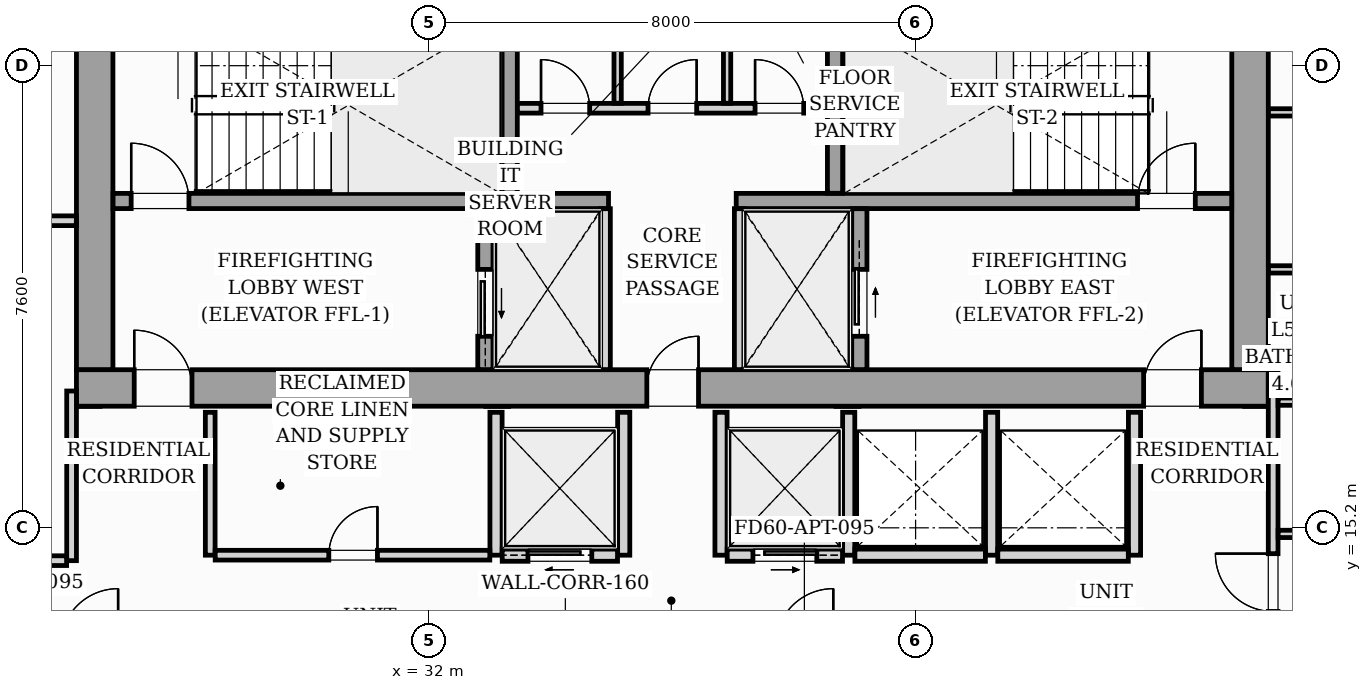
"""IFC4 building model, lengths in metres.
Left out: names, types, materials, properties, quantities, classifications, styles, units other than length and angle.
Written with IfcOpenShell. Run it as: python <this file> out.ifc"""

import sys

from ifc_helpers import new_model, si_unit, direction, frame, frame_2d, origin, origin_2d, place, context, subcontext, project, spatial, rectangle, i_section, extrude, source, transform, mapped, element, fill, save


model = new_model("IFC4")
c1 = context("Model", 3, precision=1e-05, world=origin(), true_north=direction((0.0, 1.0)))
c2 = subcontext(c1, "Body", "Model", "MODEL_VIEW")
j1 = project(units=[si_unit("LENGTHUNIT", "METRE"), si_unit("PLANEANGLEUNIT", "RADIAN")], contexts=[c1])
p1 = place(None, origin())
s1 = spatial("IfcSite", under=j1, at=p1, CompositionType="ELEMENT")
p2 = place(p1, origin())
s2 = spatial("IfcBuilding", under=s1, at=p2, CompositionType="ELEMENT")
p3 = place(p2, frame((0.0, 0.0, 179.4)))
s3 = spatial("IfcBuildingStorey", under=s2, at=p3, CompositionType="ELEMENT", Elevation=179.4)
m1 = source(origin(), c2, "Body", "SweptSolid", [
    extrude(i_section(OverallWidth=0.416, OverallDepth=0.446, WebThickness=0.039, FlangeThickness=0.063, FilletRadius=0.018, at=origin_2d()), origin(), (0.0, 0.0, 1.0), 3.196),
])
for number, where, z_axis, x_axis in (
    (1, (26.4, 17.4, 0.002), (0.0, 0.0, 1.0), (1.0, 0.0, 0.0)),
    (2, (33.12, 17.4, 0.002), (0.0, 0.0, 1.0), (1.0, 0.0, 0.0)),
    (3, (38.88, 17.4, 0.002), (0.0, 0.0, 1.0), (1.0, 0.0, 0.0)),
    (4, (45.6, 17.4, 0.002), (0.0, 0.0, 1.0), (1.0, 0.0, 0.0)),
):
    element("IfcColumn", number, at=place(p3, frame(where, z_axis=z_axis, x_axis=x_axis)), inside=s3, PredefinedType="PILASTER", context=c2, shape_type="MappedRepresentation", body=[
        mapped(m1, transform((0.0, 0.0, 0.0), scale=1.0)),
    ])
p4 = place(p3, frame((26.2, 17.5, 0.0), z_axis=(0.0, 0.0, 1.0), x_axis=(1.0, 0.0, 0.0)))
e5 = element("IfcWall", 5, at=p4, inside=s3, PredefinedType="SHEAR", context=c2, shape_type="SweptSolid", body=[
    extrude(rectangle(XDim=19.6, YDim=0.6, at=frame_2d((9.8, 0.0))), origin(), (0.0, 0.0, 1.0), 3.2),
])
p5 = place(p4, frame((0.95, 0.0, 0.0)))
e6 = element("IfcOpeningElement", 6, at=p5, cuts=e5, PredefinedType="OPENING", context=c2, shape_type="SweptSolid", body=[
    extrude(rectangle(XDim=0.95, YDim=2.06, at=frame_2d((0.475, 1.03))), frame((0.0, 0.31, 0.0), z_axis=(0.0, -1.0, 0.0), x_axis=(1.0, 0.0, 0.0)), (0.0, 0.0, 1.0), 0.62),
])
p6 = place(p4, frame((9.38, 0.0, 0.0)))
e7 = element("IfcOpeningElement", 7, at=p6, cuts=e5, PredefinedType="OPENING", context=c2, shape_type="SweptSolid", body=[
    extrude(rectangle(XDim=0.85, YDim=2.0, at=frame_2d((0.425, 1.0))), frame((0.0, 0.31, 0.0), z_axis=(0.0, -1.0, 0.0), x_axis=(1.0, 0.0, 0.0)), (0.0, 0.0, 1.0), 0.62),
])
p7 = place(p4, frame((17.55, 0.0, 0.0)))
e8 = element("IfcOpeningElement", 8, at=p7, cuts=e5, PredefinedType="OPENING", context=c2, shape_type="SweptSolid", body=[
    extrude(rectangle(XDim=0.95, YDim=2.06, at=frame_2d((0.475, 1.03))), frame((0.0, 0.31, 0.0), z_axis=(0.0, -1.0, 0.0), x_axis=(1.0, 0.0, 0.0)), (0.0, 0.0, 1.0), 0.62),
])
for number, where, z_axis, x_axis in (
    (9, (26.5, 17.802, 0.0), (0.0, 0.0, 1.0), (0.0, 1.0, 0.0)),
    (10, (45.5, 17.802, 0.0), (0.0, 0.0, 1.0), (0.0, 1.0, 0.0)),
):
    element("IfcWall", number, at=place(p3, frame(where, z_axis=z_axis, x_axis=x_axis)), inside=s3, PredefinedType="SHEAR", context=c2, shape_type="SweptSolid", body=[
        extrude(rectangle(XDim=5.796, YDim=0.6, at=frame_2d((2.898, 0.0))), origin(), (0.0, 0.0, 1.0), 3.2),
    ])
p8 = place(p3, frame((26.802, 20.575, 0.0), z_axis=(0.0, 0.0, 1.0), x_axis=(1.0, 0.0, 0.0)))
e11 = element("IfcWall", 11, at=p8, inside=s3, PredefinedType="SOLIDWALL", context=c2, shape_type="SweptSolid", body=[
    extrude(rectangle(XDim=8.148, YDim=0.25, at=frame_2d((4.074, 0.0))), origin(), (0.0, 0.0, 1.0), 3.2),
])
p9 = place(p8, frame((0.298, 0.0, 0.0)))
e12 = element("IfcOpeningElement", 12, at=p9, cuts=e11, PredefinedType="OPENING", context=c2, shape_type="SweptSolid", body=[
    extrude(rectangle(XDim=0.95, YDim=2.06, at=frame_2d((0.475, 1.03))), frame((0.0, 0.135, 0.0), z_axis=(0.0, -1.0, 0.0), x_axis=(1.0, 0.0, 0.0)), (0.0, 0.0, 1.0), 0.27),
])
p10 = place(p3, frame((37.05, 20.575, 0.0), z_axis=(0.0, 0.0, 1.0), x_axis=(1.0, 0.0, 0.0)))
e13 = element("IfcWall", 13, at=p10, inside=s3, PredefinedType="SOLIDWALL", context=c2, shape_type="SweptSolid", body=[
    extrude(rectangle(XDim=8.148, YDim=0.25, at=frame_2d((4.074, 0.0))), origin(), (0.0, 0.0, 1.0), 3.2),
])
p11 = place(p10, frame((6.6, 0.0, 0.0)))
e14 = element("IfcOpeningElement", 14, at=p11, cuts=e13, PredefinedType="OPENING", context=c2, shape_type="SweptSolid", body=[
    extrude(rectangle(XDim=0.95, YDim=2.06, at=frame_2d((0.475, 1.03))), frame((0.0, 0.135, 0.0), z_axis=(0.0, -1.0, 0.0), x_axis=(1.0, 0.0, 0.0)), (0.0, 0.0, 1.0), 0.27),
])
for number, where, z_axis, x_axis in (
    (15, (33.325, 20.702, 0.0), (0.0, 0.0, 1.0), (0.0, 1.0, 0.0)),
    (16, (38.675, 20.702, 0.0), (0.0, 0.0, 1.0), (0.0, 1.0, 0.0)),
):
    element("IfcWall", number, at=place(p3, frame(where, z_axis=z_axis, x_axis=x_axis)), inside=s3, PredefinedType="SOLIDWALL", context=c2, shape_type="SweptSolid", body=[
        extrude(rectangle(XDim=2.896, YDim=0.25, at=frame_2d((1.448, 0.0))), origin(), (0.0, 0.0, 1.0), 3.2),
    ])
p12 = place(p3, frame((32.925, 17.802, 0.0), z_axis=(0.0, 0.0, 1.0), x_axis=(0.0, 1.0, 0.0)))
e17 = element("IfcWall", 17, at=p12, inside=s3, PredefinedType="SOLIDWALL", context=c2, shape_type="SweptSolid", body=[
    extrude(rectangle(XDim=2.646, YDim=0.25, at=frame_2d((1.323, 0.0))), origin(), (0.0, 0.0, 1.0), 3.2),
])
p13 = place(p12, frame((0.548, 0.0, 0.0)))
e18 = element("IfcOpeningElement", 18, at=p13, cuts=e17, PredefinedType="OPENING", context=c2, shape_type="SweptSolid", body=[
    extrude(rectangle(XDim=1.1, YDim=2.08, at=frame_2d((0.55, 1.04))), frame((0.0, 0.135, 0.0), z_axis=(0.0, -1.0, 0.0), x_axis=(1.0, 0.0, 0.0)), (0.0, 0.0, 1.0), 0.27),
])
for number, where, z_axis, x_axis in (
    (19, (34.9, 17.802, 0.0), (0.0, 0.0, 1.0), (0.0, 1.0, 0.0)),
    (20, (37.1, 17.802, 0.0), (0.0, 0.0, 1.0), (0.0, 1.0, 0.0)),
):
    element("IfcWall", number, at=place(p3, frame(where, z_axis=z_axis, x_axis=x_axis)), inside=s3, PredefinedType="PARTITIONING", context=c2, shape_type="SweptSolid", body=[
        extrude(rectangle(XDim=2.646, YDim=0.16, at=frame_2d((1.323, 0.0))), origin(), (0.0, 0.0, 1.0), 2.94),
    ])
p14 = place(p3, frame((39.075, 17.802, 0.0), z_axis=(0.0, 0.0, 1.0), x_axis=(0.0, 1.0, 0.0)))
e21 = element("IfcWall", 21, at=p14, inside=s3, PredefinedType="SOLIDWALL", context=c2, shape_type="SweptSolid", body=[
    extrude(rectangle(XDim=2.646, YDim=0.25, at=frame_2d((1.323, 0.0))), origin(), (0.0, 0.0, 1.0), 3.2),
])
p15 = place(p14, frame((0.548, 0.0, 0.0)))
e22 = element("IfcOpeningElement", 22, at=p15, cuts=e21, PredefinedType="OPENING", context=c2, shape_type="SweptSolid", body=[
    extrude(rectangle(XDim=1.1, YDim=2.08, at=frame_2d((0.55, 1.04))), frame((0.0, 0.135, 0.0), z_axis=(0.0, -1.0, 0.0), x_axis=(1.0, 0.0, 0.0)), (0.0, 0.0, 1.0), 0.27),
])
p16 = place(p3, frame((33.452, 22.1, 0.0), z_axis=(0.0, 0.0, 1.0), x_axis=(1.0, 0.0, 0.0)))
e23 = element("IfcWall", 23, at=p16, inside=s3, PredefinedType="PARTITIONING", context=c2, shape_type="SweptSolid", body=[
    extrude(rectangle(XDim=5.096, YDim=0.16, at=frame_2d((2.548, 0.0))), origin(), (0.0, 0.0, 1.0), 2.94),
])
p17 = place(p16, frame((0.388, 0.0, 0.0)))
e24 = element("IfcOpeningElement", 24, at=p17, cuts=e23, PredefinedType="OPENING", context=c2, shape_type="SweptSolid", body=[
    extrude(rectangle(XDim=0.8, YDim=2.05, at=frame_2d((0.4, 1.025))), frame((0.0, 0.09, 0.0), z_axis=(0.0, -1.0, 0.0), x_axis=(1.0, 0.0, 0.0)), (0.0, 0.0, 1.0), 0.18),
])
p18 = place(p16, frame((2.148, 0.0, 0.0)))
e25 = element("IfcOpeningElement", 25, at=p18, cuts=e23, PredefinedType="OPENING", context=c2, shape_type="SweptSolid", body=[
    extrude(rectangle(XDim=0.8, YDim=2.05, at=frame_2d((0.4, 1.025))), frame((0.0, 0.09, 0.0), z_axis=(0.0, -1.0, 0.0), x_axis=(1.0, 0.0, 0.0)), (0.0, 0.0, 1.0), 0.18),
])
p19 = place(p16, frame((3.908, 0.0, 0.0)))
e26 = element("IfcOpeningElement", 26, at=p19, cuts=e23, PredefinedType="OPENING", context=c2, shape_type="SweptSolid", body=[
    extrude(rectangle(XDim=0.8, YDim=2.05, at=frame_2d((0.4, 1.025))), frame((0.0, 0.09, 0.0), z_axis=(0.0, -1.0, 0.0), x_axis=(1.0, 0.0, 0.0)), (0.0, 0.0, 1.0), 0.18),
])
for number, where, z_axis, x_axis in (
    (27, (35.1, 22.182, 0.0), (0.0, 0.0, 1.0), (0.0, 1.0, 0.0)),
    (28, (36.9, 22.182, 0.0), (0.0, 0.0, 1.0), (0.0, 1.0, 0.0)),
):
    element("IfcWall", number, at=place(p3, frame(where, z_axis=z_axis, x_axis=x_axis)), inside=s3, PredefinedType="PARTITIONING", context=c2, shape_type="SweptSolid", body=[
        extrude(rectangle(XDim=1.416, YDim=0.12, at=frame_2d((0.708, 0.0))), origin(), (0.0, 0.0, 1.0), 2.94),
    ])
p20 = place(p3, frame((28.4, 14.75, 0.0), z_axis=(0.0, 0.0, 1.0), x_axis=(0.0, 1.0, 0.0)))
e29 = element("IfcWall", 29, at=p20, inside=s3, PredefinedType="PARTITIONING", context=c2, shape_type="SweptSolid", body=[
    extrude(rectangle(XDim=2.35, YDim=0.16, at=frame_2d((1.175, 0.0))), origin(), (0.0, 0.0, 1.0), 2.94),
])
p21 = place(p3, frame((33.1, 14.75, 0.0), z_axis=(0.0, 0.0, 1.0), x_axis=(0.0, 1.0, 0.0)))
e30 = element("IfcWall", 30, at=p21, inside=s3, PredefinedType="PARTITIONING", context=c2, shape_type="SweptSolid", body=[
    extrude(rectangle(XDim=2.35, YDim=0.2, at=frame_2d((1.175, 0.0))), origin(), (0.0, 0.0, 1.0), 2.94),
])
p22 = place(p3, frame((28.482, 14.75, 0.0), z_axis=(0.0, 0.0, 1.0), x_axis=(1.0, 0.0, 0.0)))
e31 = element("IfcWall", 31, at=p22, inside=s3, PredefinedType="PARTITIONING", context=c2, shape_type="SweptSolid", body=[
    extrude(rectangle(XDim=4.516, YDim=0.16, at=frame_2d((2.258, 0.0))), origin(), (0.0, 0.0, 1.0), 2.94),
])
p23 = place(p22, frame((1.868, 0.0, 0.0)))
e32 = element("IfcOpeningElement", 32, at=p23, cuts=e31, PredefinedType="OPENING", context=c2, shape_type="SweptSolid", body=[
    extrude(rectangle(XDim=0.8, YDim=2.05, at=frame_2d((0.4, 1.025))), frame((0.0, 0.09, 0.0), z_axis=(0.0, -1.0, 0.0), x_axis=(1.0, 0.0, 0.0)), (0.0, 0.0, 1.0), 0.18),
])
p24 = place(p3, frame((35.2, 14.75, 0.0), z_axis=(0.0, 0.0, 1.0), x_axis=(0.0, 1.0, 0.0)))
e33 = element("IfcWall", 33, at=p24, inside=s3, PredefinedType="PARTITIONING", context=c2, shape_type="SweptSolid", body=[
    extrude(rectangle(XDim=2.35, YDim=0.2, at=frame_2d((1.175, 0.0))), origin(), (0.0, 0.0, 1.0), 2.94),
])
p25 = place(p3, frame((33.202, 14.75, 0.0), z_axis=(0.0, 0.0, 1.0), x_axis=(1.0, 0.0, 0.0)))
e34 = element("IfcWall", 34, at=p25, inside=s3, PredefinedType="PARTITIONING", context=c2, shape_type="SweptSolid", body=[
    extrude(rectangle(XDim=1.896, YDim=0.2, at=frame_2d((0.948, 0.0))), origin(), (0.0, 0.0, 1.0), 2.94),
])
p26 = place(p25, frame((0.423, 0.0, 0.0)))
e35 = element("IfcOpeningElement", 35, at=p26, cuts=e34, PredefinedType="OPENING", context=c2, shape_type="SweptSolid", body=[
    extrude(rectangle(XDim=1.05, YDim=2.08, at=frame_2d((0.525, 1.04))), frame((0.0, 0.11, 0.0), z_axis=(0.0, -1.0, 0.0), x_axis=(1.0, 0.0, 0.0)), (0.0, 0.0, 1.0), 0.22),
])
for number, where, z_axis, x_axis in (
    (36, (36.8, 14.75, 0.0), (0.0, 0.0, 1.0), (0.0, 1.0, 0.0)),
    (37, (38.9, 14.75, 0.0), (0.0, 0.0, 1.0), (0.0, 1.0, 0.0)),
):
    element("IfcWall", number, at=place(p3, frame(where, z_axis=z_axis, x_axis=x_axis)), inside=s3, PredefinedType="PARTITIONING", context=c2, shape_type="SweptSolid", body=[
        extrude(rectangle(XDim=2.35, YDim=0.2, at=frame_2d((1.175, 0.0))), origin(), (0.0, 0.0, 1.0), 2.94),
    ])
p27 = place(p3, frame((36.902, 14.75, 0.0), z_axis=(0.0, 0.0, 1.0), x_axis=(1.0, 0.0, 0.0)))
e38 = element("IfcWall", 38, at=p27, inside=s3, PredefinedType="PARTITIONING", context=c2, shape_type="SweptSolid", body=[
    extrude(rectangle(XDim=1.896, YDim=0.2, at=frame_2d((0.948, 0.0))), origin(), (0.0, 0.0, 1.0), 2.94),
])
p28 = place(p27, frame((0.423, 0.0, 0.0)))
e39 = element("IfcOpeningElement", 39, at=p28, cuts=e38, PredefinedType="OPENING", context=c2, shape_type="SweptSolid", body=[
    extrude(rectangle(XDim=1.05, YDim=2.08, at=frame_2d((0.525, 1.04))), frame((0.0, 0.11, 0.0), z_axis=(0.0, -1.0, 0.0), x_axis=(1.0, 0.0, 0.0)), (0.0, 0.0, 1.0), 0.22),
])
for number, where, z_axis, x_axis in (
    (40, (41.25, 14.75, 0.0), (0.0, 0.0, 1.0), (0.0, 1.0, 0.0)),
    (41, (43.6, 14.75, 0.0), (0.0, 0.0, 1.0), (0.0, 1.0, 0.0)),
):
    element("IfcWall", number, at=place(p3, frame(where, z_axis=z_axis, x_axis=x_axis)), inside=s3, PredefinedType="PARTITIONING", context=c2, shape_type="SweptSolid", body=[
        extrude(rectangle(XDim=2.35, YDim=0.2, at=frame_2d((1.175, 0.0))), origin(), (0.0, 0.0, 1.0), 2.94),
    ])
for number, where, z_axis, x_axis in (
    (42, (39.002, 14.75, 0.0), (0.0, 0.0, 1.0), (1.0, 0.0, 0.0)),
    (43, (41.352, 14.75, 0.0), (0.0, 0.0, 1.0), (1.0, 0.0, 0.0)),
):
    element("IfcWall", number, at=place(p3, frame(where, z_axis=z_axis, x_axis=x_axis)), inside=s3, PredefinedType="PARTITIONING", context=c2, shape_type="SweptSolid", body=[
        extrude(rectangle(XDim=2.146, YDim=0.2, at=frame_2d((1.073, 0.0))), origin(), (0.0, 0.0, 1.0), 2.94),
    ])
p29 = place(p3, frame((45.88, 13.332, 0.0), z_axis=(0.0, 0.0, 1.0), x_axis=(0.0, 1.0, 0.0)))
e44 = element("IfcWall", 44, at=p29, inside=s3, PredefinedType="PARTITIONING", context=c2, shape_type="SweptSolid", body=[
    extrude(rectangle(XDim=4.47, YDim=0.16, at=frame_2d((2.235, 0.0))), origin(), (0.0, 0.0, 1.0), 2.94),
])
p30 = place(p29, frame((0.493, 0.0, 0.0)))
e45 = element("IfcOpeningElement", 45, at=p30, cuts=e44, PredefinedType="OPENING", context=c2, shape_type="SweptSolid", body=[
    extrude(rectangle(XDim=0.95, YDim=2.06, at=frame_2d((0.475, 1.03))), frame((0.0, 0.09, 0.0), z_axis=(0.0, -1.0, 0.0), x_axis=(1.0, 0.0, 0.0)), (0.0, 0.0, 1.0), 0.18),
])
for number, where, z_axis, x_axis in (
    (46, (45.962, 17.275, 0.0), (0.0, 0.0, 1.0), (1.0, 0.0, 0.0)),
    (47, (45.962, 15.1, 0.0), (0.0, 0.0, 1.0), (1.0, 0.0, 0.0)),
):
    element("IfcWall", number, at=place(p3, frame(where, z_axis=z_axis, x_axis=x_axis)), inside=s3, PredefinedType="PARTITIONING", context=c2, shape_type="SweptSolid", body=[
        extrude(rectangle(XDim=2.256, YDim=0.12, at=frame_2d((1.128, 0.0))), origin(), (0.0, 0.0, 1.0), 2.94),
    ])
p31 = place(p3, frame((45.802, 19.45, 0.0), z_axis=(0.0, 0.0, 1.0), x_axis=(1.0, 0.0, 0.0)))
e48 = element("IfcWall", 48, at=p31, inside=s3, PredefinedType="PARTITIONING", context=c2, shape_type="SweptSolid", body=[
    extrude(rectangle(XDim=2.416, YDim=0.12, at=frame_2d((1.208, 0.0))), origin(), (0.0, 0.0, 1.0), 2.94),
])
p32 = place(p3, frame((45.802, 22.032, 0.0), z_axis=(0.0, 0.0, 1.0), x_axis=(1.0, 0.0, 0.0)))
e49 = element("IfcWall", 49, at=p32, inside=s3, PredefinedType="PARTITIONING", context=c2, shape_type="SweptSolid", body=[
    extrude(rectangle(XDim=18.499, YDim=0.12, at=frame_2d((9.25, 0.0))), origin(), (0.0, 0.0, 1.0), 2.94),
])
p33 = place(p32, frame((8.911, 0.0, 0.0)))
e50 = element("IfcOpeningElement", 50, at=p33, cuts=e49, PredefinedType="OPENING", context=c2, shape_type="SweptSolid", body=[
    extrude(rectangle(XDim=0.85, YDim=2.05, at=frame_2d((0.425, 1.025))), frame((0.0, 0.07, 0.0), z_axis=(0.0, -1.0, 0.0), x_axis=(1.0, 0.0, 0.0)), (0.0, 0.0, 1.0), 0.14),
])
p34 = place(p3, frame((24.732, 20.25, 0.0), z_axis=(0.0, 0.0, 1.0), x_axis=(1.0, 0.0, 0.0)))
e51 = element("IfcWall", 51, at=p34, inside=s3, PredefinedType="PARTITIONING", context=c2, shape_type="SweptSolid", body=[
    extrude(rectangle(XDim=1.466, YDim=0.16, at=frame_2d((0.733, 0.0))), origin(), (0.0, 0.0, 1.0), 2.94),
])
p35 = place(p3, frame((26.12, 14.66, 0.0), z_axis=(0.0, 0.0, 1.0), x_axis=(0.0, 1.0, 0.0)))
e52 = element("IfcWall", 52, at=p35, inside=s3, PredefinedType="PARTITIONING", context=c2, shape_type="SweptSolid", body=[
    extrude(rectangle(XDim=2.79, YDim=0.16, at=frame_2d((1.395, 0.0))), origin(), (0.0, 0.0, 1.0), 2.94),
])
p36 = place(p3, frame((24.732, 14.66, 0.0), z_axis=(0.0, 0.0, 1.0), x_axis=(1.0, 0.0, 0.0)))
e53 = element("IfcWall", 53, at=p36, inside=s3, PredefinedType="PARTITIONING", context=c2, shape_type="SweptSolid", body=[
    extrude(rectangle(XDim=1.306, YDim=0.16, at=frame_2d((0.653, 0.0))), origin(), (0.0, 0.0, 1.0), 2.94),
])
m2 = source(origin(), c2, "Body", "SweptSolid", [
    extrude(rectangle(XDim=0.95, YDim=2.06, at=frame_2d((0.475, 1.03))), frame((0.0, 0.025, 0.0), z_axis=(0.0, -1.0, 0.0), x_axis=(1.0, 0.0, 0.0)), (0.0, 0.0, 1.0), 0.05),
])
p37 = place(p5, origin())
e54 = element("IfcDoor", 54, at=p37, inside=s3, OperationType="SINGLE_SWING_LEFT", PredefinedType="DOOR", context=c2, shape_type="MappedRepresentation", body=[
    mapped(m2, transform((0.0, 0.0, 0.0), scale=1.0)),
])
fill(e6, e54)
m3 = source(origin(), c2, "Body", "SweptSolid", [
    extrude(rectangle(XDim=0.85, YDim=2.0, at=frame_2d((0.425, 1.0))), frame((0.0, 0.025, 0.0), z_axis=(0.0, -1.0, 0.0), x_axis=(1.0, 0.0, 0.0)), (0.0, 0.0, 1.0), 0.05),
])
p38 = place(p6, origin())
e55 = element("IfcDoor", 55, at=p38, inside=s3, OperationType="SINGLE_SWING_RIGHT", PredefinedType="DOOR", context=c2, shape_type="MappedRepresentation", body=[
    mapped(m3, transform((0.0, 0.0, 0.0), scale=1.0)),
])
fill(e7, e55)
p39 = place(p7, origin())
e56 = element("IfcDoor", 56, at=p39, inside=s3, OperationType="SINGLE_SWING_RIGHT", PredefinedType="DOOR", context=c2, shape_type="MappedRepresentation", body=[
    mapped(m2, transform((0.0, 0.0, 0.0), scale=1.0)),
])
fill(e8, e56)
p40 = place(p9, origin())
e57 = element("IfcDoor", 57, at=p40, inside=s3, OperationType="SINGLE_SWING_LEFT", PredefinedType="DOOR", context=c2, shape_type="MappedRepresentation", body=[
    mapped(m2, transform((0.0, 0.0, 0.0), scale=1.0)),
])
fill(e12, e57)
p41 = place(p11, origin())
e58 = element("IfcDoor", 58, at=p41, inside=s3, OperationType="SINGLE_SWING_RIGHT", PredefinedType="DOOR", context=c2, shape_type="MappedRepresentation", body=[
    mapped(m2, transform((0.0, 0.0, 0.0), scale=1.0)),
])
fill(e14, e58)
m4 = source(origin(), c2, "Body", "SweptSolid", [
    extrude(rectangle(XDim=1.1, YDim=2.08, at=frame_2d((0.55, 1.04))), frame((0.0, 0.025, 0.0), z_axis=(0.0, -1.0, 0.0), x_axis=(1.0, 0.0, 0.0)), (0.0, 0.0, 1.0), 0.05),
])
p42 = place(p13, origin())
e59 = element("IfcDoor", 59, at=p42, inside=s3, OperationType="SLIDING_TO_LEFT", PredefinedType="DOOR", context=c2, shape_type="MappedRepresentation", body=[
    mapped(m4, transform((0.0, 0.0, 0.0), scale=1.0)),
])
fill(e18, e59)
p43 = place(p15, origin())
e60 = element("IfcDoor", 60, at=p43, inside=s3, OperationType="SLIDING_TO_RIGHT", PredefinedType="DOOR", context=c2, shape_type="MappedRepresentation", body=[
    mapped(m4, transform((0.0, 0.0, 0.0), scale=1.0)),
])
fill(e22, e60)
m5 = source(origin(), c2, "Body", "SweptSolid", [
    extrude(rectangle(XDim=0.8, YDim=2.05, at=frame_2d((0.4, 1.025))), frame((0.0, 0.025, 0.0), z_axis=(0.0, -1.0, 0.0), x_axis=(1.0, 0.0, 0.0)), (0.0, 0.0, 1.0), 0.05),
])
p44 = place(p17, origin())
e61 = element("IfcDoor", 61, at=p44, inside=s3, OperationType="SINGLE_SWING_LEFT", PredefinedType="DOOR", context=c2, shape_type="MappedRepresentation", body=[
    mapped(m5, transform((0.0, 0.0, 0.0), scale=1.0)),
])
fill(e24, e61)
p45 = place(p18, origin())
e62 = element("IfcDoor", 62, at=p45, inside=s3, OperationType="SINGLE_SWING_RIGHT", PredefinedType="DOOR", context=c2, shape_type="MappedRepresentation", body=[
    mapped(m5, transform((0.0, 0.0, 0.0), scale=1.0)),
])
fill(e25, e62)
p46 = place(p19, origin())
e63 = element("IfcDoor", 63, at=p46, inside=s3, OperationType="SINGLE_SWING_LEFT", PredefinedType="DOOR", context=c2, shape_type="MappedRepresentation", body=[
    mapped(m5, transform((0.0, 0.0, 0.0), scale=1.0)),
])
fill(e26, e63)
p47 = place(p23, origin())
e64 = element("IfcDoor", 64, at=p47, inside=s3, OperationType="SINGLE_SWING_RIGHT", PredefinedType="DOOR", context=c2, shape_type="MappedRepresentation", body=[
    mapped(m5, transform((0.0, 0.0, 0.0), scale=1.0)),
])
fill(e32, e64)
m6 = source(origin(), c2, "Body", "SweptSolid", [
    extrude(rectangle(XDim=1.05, YDim=2.08, at=frame_2d((0.525, 1.04))), frame((0.0, 0.025, 0.0), z_axis=(0.0, -1.0, 0.0), x_axis=(1.0, 0.0, 0.0)), (0.0, 0.0, 1.0), 0.05),
])
p48 = place(p26, origin())
e65 = element("IfcDoor", 65, at=p48, inside=s3, OperationType="SLIDING_TO_LEFT", PredefinedType="DOOR", context=c2, shape_type="MappedRepresentation", body=[
    mapped(m6, transform((0.0, 0.0, 0.0), scale=1.0)),
])
fill(e35, e65)
p49 = place(p28, origin())
e66 = element("IfcDoor", 66, at=p49, inside=s3, OperationType="SLIDING_TO_RIGHT", PredefinedType="DOOR", context=c2, shape_type="MappedRepresentation", body=[
    mapped(m6, transform((0.0, 0.0, 0.0), scale=1.0)),
])
fill(e39, e66)
m7 = source(origin(), c2, "Body", "SweptSolid", [
    extrude(rectangle(XDim=0.95, YDim=2.06, at=frame_2d((0.475, 1.03))), frame((0.0, 0.025, 0.0), z_axis=(0.0, -1.0, 0.0), x_axis=(1.0, 0.0, 0.0)), (0.0, 0.0, 1.0), 0.05),
])
p50 = place(p30, origin())
e67 = element("IfcDoor", 67, at=p50, inside=s3, OperationType="SINGLE_SWING_RIGHT", PredefinedType="DOOR", context=c2, shape_type="MappedRepresentation", body=[
    mapped(m7, transform((0.0, 0.0, 0.0), scale=1.0)),
])
fill(e45, e67)
save(model, sys.argv[1])
